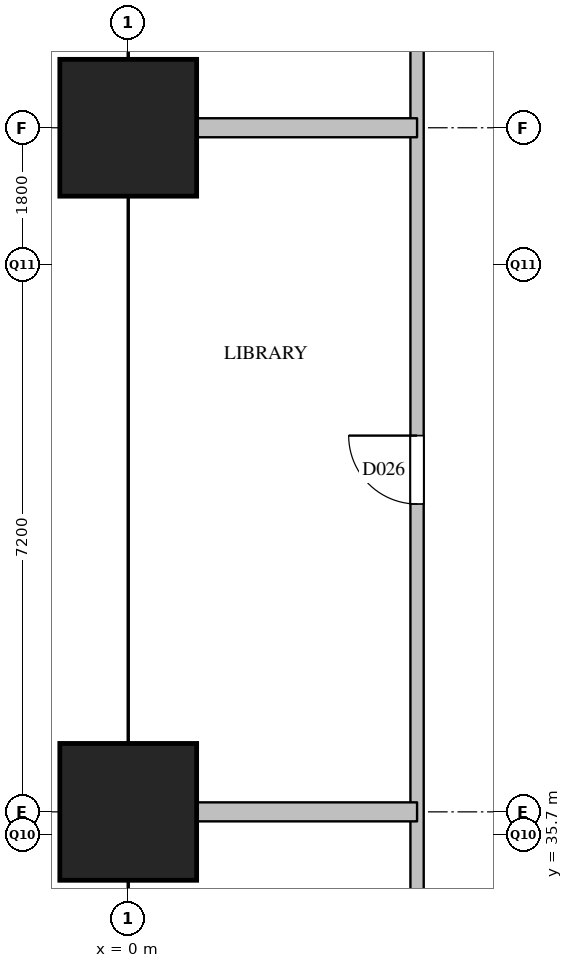
"""IFC4 building model, lengths in metres.
Left out: names, types, materials, properties, quantities, classifications, styles, units other than length and angle.
Written with IfcOpenShell. Run it as: python <this file> out.ifc"""

import sys

from ifc_helpers import new_model, si_unit, direction, frame, frame_2d, origin, origin_2d, place, context, subcontext, project, spatial, rectangle, extrude, element, fill, save


model = new_model("IFC4")
c1 = context("Model", 3, precision=1e-05, world=origin(), true_north=direction((0.0, 1.0)))
c2 = subcontext(c1, "Body", "Model", "MODEL_VIEW")
j1 = project(units=[si_unit("LENGTHUNIT", "METRE"), si_unit("PLANEANGLEUNIT", "RADIAN")], contexts=[c1])
p1 = place(None, origin())
s1 = spatial("IfcSite", under=j1, at=p1, CompositionType="ELEMENT")
p2 = place(p1, origin())
s2 = spatial("IfcBuilding", under=s1, at=p2, CompositionType="ELEMENT")
p3 = place(p2, frame((0.0, 0.0, 100.6)))
s3 = spatial("IfcBuildingStorey", under=s2, at=p3, CompositionType="ELEMENT", Elevation=100.6)
for number, where, z_axis, x_axis in (
    (1, (0.0, 36.0, 0.0), (0.0, 0.0, 1.0), (1.0, 0.0, 0.0)),
    (2, (0.0, 45.0, 0.0), (0.0, 0.0, 1.0), (1.0, 0.0, 0.0)),
):
    element("IfcColumn", number, at=place(p3, frame(where, z_axis=z_axis, x_axis=x_axis)), inside=s3, PredefinedType="COLUMN", context=c2, shape_type="SweptSolid", body=[
        extrude(rectangle(XDim=1.8, YDim=1.8, at=origin_2d()), origin(), (0.0, 0.0, 1.0), 3.8),
    ])
p4 = place(p3, frame((3.8, 28.5, 0.0), z_axis=(0.0, 0.0, 1.0), x_axis=(0.0, 1.0, 0.0)))
e3 = element("IfcWall", 3, at=p4, inside=s3, PredefinedType="PARTITIONING", context=c2, shape_type="SweptSolid", body=[
    extrude(rectangle(XDim=23.3, YDim=0.175, at=frame_2d((11.65, 0.0))), origin(), (0.0, 0.0, 1.0), 3.5),
])
p5 = place(p4, frame((3.3, 0.0, 0.0)))
e4 = element("IfcOpeningElement", 4, at=p5, cuts=e3, PredefinedType="OPENING", context=c2, shape_type="SweptSolid", body=[
    extrude(rectangle(XDim=0.9, YDim=2.1, at=frame_2d((0.45, 1.05))), frame((0.0, 0.097, 0.0), z_axis=(0.0, -1.0, 0.0), x_axis=(1.0, 0.0, 0.0)), (0.0, 0.0, 1.0), 0.195),
])
p6 = place(p4, frame((11.55, 0.0, 0.0)))
e5 = element("IfcOpeningElement", 5, at=p6, cuts=e3, PredefinedType="OPENING", context=c2, shape_type="SweptSolid", body=[
    extrude(rectangle(XDim=0.9, YDim=2.1, at=frame_2d((0.45, 1.05))), frame((0.0, 0.097, 0.0), z_axis=(0.0, -1.0, 0.0), x_axis=(1.0, 0.0, 0.0)), (0.0, 0.0, 1.0), 0.195),
])
p7 = place(p4, frame((19.45, 0.0, 0.0)))
e6 = element("IfcOpeningElement", 6, at=p7, cuts=e3, PredefinedType="OPENING", context=c2, shape_type="SweptSolid", body=[
    extrude(rectangle(XDim=0.9, YDim=2.1, at=frame_2d((0.45, 1.05))), frame((0.0, 0.097, 0.0), z_axis=(0.0, -1.0, 0.0), x_axis=(1.0, 0.0, 0.0)), (0.0, 0.0, 1.0), 0.195),
])
for number, where, z_axis, x_axis in (
    (7, (0.0, 36.0, 0.0), (0.0, 0.0, 1.0), (1.0, 0.0, 0.0)),
    (8, (0.0, 45.0, 0.0), (0.0, 0.0, 1.0), (1.0, 0.0, 0.0)),
):
    element("IfcWall", number, at=place(p3, frame(where, z_axis=z_axis, x_axis=x_axis)), inside=s3, PredefinedType="PARTITIONING", context=c2, shape_type="SweptSolid", body=[
        extrude(rectangle(XDim=3.8, YDim=0.25, at=frame_2d((1.9, 0.0))), origin(), (0.0, 0.0, 1.0), 3.5),
    ])
p8 = place(p6, origin())
e9 = element("IfcDoor", 9, at=p8, inside=s3, OperationType="SINGLE_SWING_RIGHT", PredefinedType="DOOR", context=c2, shape_type="SweptSolid", body=[
    extrude(rectangle(XDim=0.9, YDim=2.1, at=frame_2d((0.45, 1.05))), frame((0.0, 0.025, 0.0), z_axis=(0.0, -1.0, 0.0), x_axis=(1.0, 0.0, 0.0)), (0.0, 0.0, 1.0), 0.05),
])
fill(e5, e9)
save(model, sys.argv[1])
